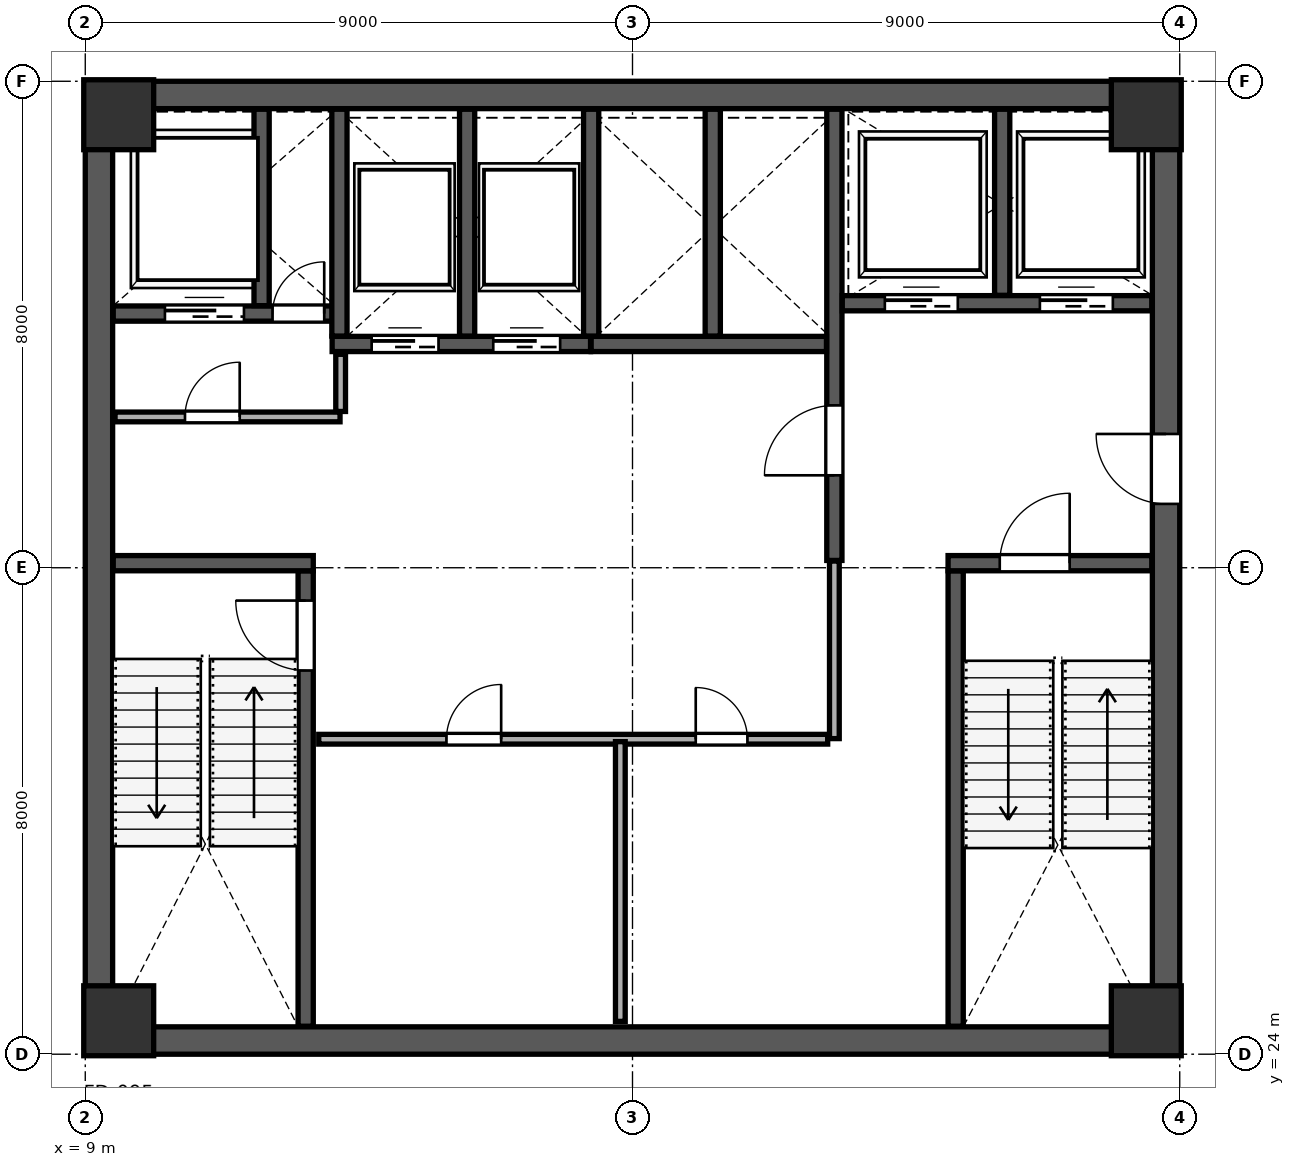
"""IFC4 building model, lengths in metres.
Left out: names, types, materials, properties, quantities, classifications, styles, units other than length and angle.
Written with IfcOpenShell. Run it as: python <this file> out.ifc"""

import sys

from ifc_helpers import new_model, si_unit, direction, frame, frame_2d, origin, origin_2d, place, context, subcontext, project, spatial, rectangle, extrude, source, transform, mapped, element, fill, save


model = new_model("IFC4")
c1 = context("Model", 3, precision=1e-05, world=origin(), true_north=direction((0.0, 1.0)))
c2 = subcontext(c1, "Body", "Model", "MODEL_VIEW")
j1 = project(units=[si_unit("LENGTHUNIT", "METRE"), si_unit("PLANEANGLEUNIT", "RADIAN")], contexts=[c1])
p1 = place(None, origin())
s1 = spatial("IfcSite", under=j1, at=p1, CompositionType="ELEMENT")
p2 = place(p1, origin())
s2 = spatial("IfcBuilding", under=s1, at=p2, CompositionType="ELEMENT")
p3 = place(p2, frame((0.0, 0.0, 141.4)))
s3 = spatial("IfcBuildingStorey", under=s2, at=p3, CompositionType="ELEMENT", Elevation=141.4)
m1 = source(origin(), c2, "Body", "SweptSolid", [
    extrude(rectangle(XDim=1.15, YDim=1.15, at=origin_2d()), origin(), (0.0, 0.0, 1.0), 4.199),
])
for number, where, z_axis, x_axis in (
    (1, (9.55, 24.55, 0.001), (0.0, 0.0, 1.0), (1.0, 0.0, 0.0)),
    (2, (26.45, 24.55, 0.001), (0.0, 0.0, 1.0), (1.0, 0.0, 0.0)),
    (3, (9.55, 39.45, 0.001), (0.0, 0.0, 1.0), (1.0, 0.0, 0.0)),
    (4, (26.45, 39.45, 0.001), (0.0, 0.0, 1.0), (1.0, 0.0, 0.0)),
):
    element("IfcColumn", number, at=place(p3, frame(where, z_axis=z_axis, x_axis=x_axis)), inside=s3, PredefinedType="COLUMN", context=c2, shape_type="MappedRepresentation", body=[
        mapped(m1, transform((0.0, 0.0, 0.0), scale=1.0)),
    ])
p4 = place(p3, frame((9.225, 24.45, 0.0), z_axis=(0.0, 0.0, 1.0), x_axis=(0.0, 1.0, 0.0)))
e5 = element("IfcWall", 5, at=p4, inside=s3, PredefinedType="SHEAR", context=c2, shape_type="SweptSolid", body=[
    extrude(rectangle(XDim=15.1, YDim=0.45, at=frame_2d((7.55, 0.0))), origin(), (0.0, 0.0, 1.0), 3.96),
])
p5 = place(p3, frame((26.775, 24.45, 0.0), z_axis=(0.0, 0.0, 1.0), x_axis=(0.0, 1.0, 0.0)))
e6 = element("IfcWall", 6, at=p5, inside=s3, PredefinedType="SHEAR", context=c2, shape_type="SweptSolid", body=[
    extrude(rectangle(XDim=15.1, YDim=0.45, at=frame_2d((7.55, 0.0))), origin(), (0.0, 0.0, 1.0), 3.96),
])
p6 = place(p5, frame((8.6, 0.0, 0.0)))
e7 = element("IfcOpeningElement", 7, at=p6, cuts=e6, PredefinedType="OPENING", context=c2, shape_type="SweptSolid", body=[
    extrude(rectangle(XDim=1.15, YDim=2.2, at=frame_2d((0.575, 1.1))), frame((0.0, 0.235, 0.0), z_axis=(0.0, -1.0, 0.0), x_axis=(1.0, 0.0, 0.0)), (0.0, 0.0, 1.0), 0.47),
])
for number, where, z_axis, x_axis in (
    (8, (9.0, 24.225, 0.0), (0.0, 0.0, 1.0), (1.0, 0.0, 0.0)),
    (9, (9.0, 39.775, 0.0), (0.0, 0.0, 1.0), (1.0, 0.0, 0.0)),
):
    element("IfcWall", number, at=place(p3, frame(where, z_axis=z_axis, x_axis=x_axis)), inside=s3, PredefinedType="SHEAR", context=c2, shape_type="SweptSolid", body=[
        extrude(rectangle(XDim=18.0, YDim=0.45, at=frame_2d((9.0, 0.0))), origin(), (0.0, 0.0, 1.0), 3.96),
    ])
p7 = place(p3, frame((12.625, 24.46, 0.0), z_axis=(0.0, 0.0, 1.0), x_axis=(0.0, 1.0, 0.0)))
e10 = element("IfcWall", 10, at=p7, inside=s3, PredefinedType="SHEAR", context=c2, shape_type="SweptSolid", body=[
    extrude(rectangle(XDim=7.49, YDim=0.25, at=frame_2d((3.745, 0.0))), origin(), (0.0, 0.0, 1.0), 3.96),
])
p8 = place(p7, frame((5.85, 0.0, 0.0)))
e11 = element("IfcOpeningElement", 11, at=p8, cuts=e10, PredefinedType="OPENING", context=c2, shape_type="SweptSolid", body=[
    extrude(rectangle(XDim=1.15, YDim=2.2, at=frame_2d((0.575, 1.1))), frame((0.0, 0.135, 0.0), z_axis=(0.0, -1.0, 0.0), x_axis=(1.0, 0.0, 0.0)), (0.0, 0.0, 1.0), 0.27),
])
p9 = place(p3, frame((9.46, 32.075, 0.0), z_axis=(0.0, 0.0, 1.0), x_axis=(1.0, 0.0, 0.0)))
e12 = element("IfcWall", 12, at=p9, inside=s3, PredefinedType="SHEAR", context=c2, shape_type="SweptSolid", body=[
    extrude(rectangle(XDim=3.29, YDim=0.25, at=frame_2d((1.645, 0.0))), origin(), (0.0, 0.0, 1.0), 3.96),
])
p10 = place(p3, frame((23.315, 24.46, 0.0), z_axis=(0.0, 0.0, 1.0), x_axis=(0.0, 1.0, 0.0)))
e13 = element("IfcWall", 13, at=p10, inside=s3, PredefinedType="SHEAR", context=c2, shape_type="SweptSolid", body=[
    extrude(rectangle(XDim=7.49, YDim=0.25, at=frame_2d((3.745, 0.0))), origin(), (0.0, 0.0, 1.0), 3.96),
])
p11 = place(p3, frame((23.19, 32.075, 0.0), z_axis=(0.0, 0.0, 1.0), x_axis=(1.0, 0.0, 0.0)))
e14 = element("IfcWall", 14, at=p11, inside=s3, PredefinedType="SHEAR", context=c2, shape_type="SweptSolid", body=[
    extrude(rectangle(XDim=3.35, YDim=0.25, at=frame_2d((1.675, 0.0))), origin(), (0.0, 0.0, 1.0), 3.96),
])
p12 = place(p11, frame((0.85, 0.0, 0.0)))
e15 = element("IfcOpeningElement", 15, at=p12, cuts=e14, PredefinedType="OPENING", context=c2, shape_type="SweptSolid", body=[
    extrude(rectangle(XDim=1.15, YDim=2.2, at=frame_2d((0.575, 1.1))), frame((0.0, 0.135, 0.0), z_axis=(0.0, -1.0, 0.0), x_axis=(1.0, 0.0, 0.0)), (0.0, 0.0, 1.0), 0.27),
])
p13 = place(p3, frame((21.32, 32.12, 0.0), z_axis=(0.0, 0.0, 1.0), x_axis=(0.0, 1.0, 0.0)))
e16 = element("IfcWall", 16, at=p13, inside=s3, PredefinedType="SHEAR", context=c2, shape_type="SweptSolid", body=[
    extrude(rectangle(XDim=7.42, YDim=0.25, at=frame_2d((3.71, 0.0))), origin(), (0.0, 0.0, 1.0), 3.96),
])
p14 = place(p13, frame((1.4, 0.0, 0.0)))
e17 = element("IfcOpeningElement", 17, at=p14, cuts=e16, PredefinedType="OPENING", context=c2, shape_type="SweptSolid", body=[
    extrude(rectangle(XDim=1.15, YDim=2.2, at=frame_2d((0.575, 1.1))), frame((0.0, 0.135, 0.0), z_axis=(0.0, -1.0, 0.0), x_axis=(1.0, 0.0, 0.0)), (0.0, 0.0, 1.0), 0.27),
])
p15 = place(p3, frame((9.46, 36.18, 0.0), z_axis=(0.0, 0.0, 1.0), x_axis=(1.0, 0.0, 0.0)))
e18 = element("IfcWall", 18, at=p15, inside=s3, PredefinedType="SHEAR", context=c2, shape_type="SweptSolid", body=[
    extrude(rectangle(XDim=3.79, YDim=0.25, at=frame_2d((1.895, 0.0))), origin(), (0.0, 0.0, 1.0), 3.96),
])
p16 = place(p15, frame((2.62, 0.0, 0.0)))
e19 = element("IfcOpeningElement", 19, at=p16, cuts=e18, PredefinedType="OPENING", context=c2, shape_type="SweptSolid", body=[
    extrude(rectangle(XDim=0.85, YDim=2.1, at=frame_2d((0.425, 1.05))), frame((0.0, 0.135, 0.0), z_axis=(0.0, -1.0, 0.0), x_axis=(1.0, 0.0, 0.0)), (0.0, 0.0, 1.0), 0.27),
])
p17 = place(p15, frame((0.85, 0.0, 0.0)))
e20 = element("IfcOpeningElement", 20, at=p17, cuts=e18, PredefinedType="OPENING", context=c2, shape_type="SweptSolid", body=[
    extrude(rectangle(XDim=1.3, YDim=2.25, at=frame_2d((0.65, 1.125))), frame((0.0, 0.135, 0.0), z_axis=(0.0, -1.0, 0.0), x_axis=(1.0, 0.0, 0.0)), (0.0, 0.0, 1.0), 0.27),
])
p18 = place(p3, frame((11.9, 36.31, 0.0), z_axis=(0.0, 0.0, 1.0), x_axis=(0.0, 1.0, 0.0)))
e21 = element("IfcWall", 21, at=p18, inside=s3, PredefinedType="SHEAR", context=c2, shape_type="SweptSolid", body=[
    extrude(rectangle(XDim=3.23, YDim=0.25, at=frame_2d((1.615, 0.0))), origin(), (0.0, 0.0, 1.0), 3.96),
])
p19 = place(p3, frame((21.45, 36.35, 0.0), z_axis=(0.0, 0.0, 1.0), x_axis=(1.0, 0.0, 0.0)))
e22 = element("IfcWall", 22, at=p19, inside=s3, PredefinedType="SHEAR", context=c2, shape_type="SweptSolid", body=[
    extrude(rectangle(XDim=5.09, YDim=0.25, at=frame_2d((2.545, 0.0))), origin(), (0.0, 0.0, 1.0), 3.96),
])
p20 = place(p19, frame((0.7, 0.0, 0.0)))
e23 = element("IfcOpeningElement", 23, at=p20, cuts=e22, PredefinedType="OPENING", context=c2, shape_type="SweptSolid", body=[
    extrude(rectangle(XDim=1.2, YDim=2.2, at=frame_2d((0.6, 1.1))), frame((0.0, 0.135, 0.0), z_axis=(0.0, -1.0, 0.0), x_axis=(1.0, 0.0, 0.0)), (0.0, 0.0, 1.0), 0.27),
])
p21 = place(p19, frame((3.25, 0.0, 0.0)))
e24 = element("IfcOpeningElement", 24, at=p21, cuts=e22, PredefinedType="OPENING", context=c2, shape_type="SweptSolid", body=[
    extrude(rectangle(XDim=1.2, YDim=2.2, at=frame_2d((0.6, 1.1))), frame((0.0, 0.135, 0.0), z_axis=(0.0, -1.0, 0.0), x_axis=(1.0, 0.0, 0.0)), (0.0, 0.0, 1.0), 0.27),
])
p22 = place(p3, frame((24.08, 36.48, 0.0), z_axis=(0.0, 0.0, 1.0), x_axis=(0.0, 1.0, 0.0)))
e25 = element("IfcWall", 25, at=p22, inside=s3, PredefinedType="SHEAR", context=c2, shape_type="SweptSolid", body=[
    extrude(rectangle(XDim=3.06, YDim=0.25, at=frame_2d((1.53, 0.0))), origin(), (0.0, 0.0, 1.0), 3.96),
])
p23 = place(p3, frame((13.06, 35.68, 0.0), z_axis=(0.0, 0.0, 1.0), x_axis=(1.0, 0.0, 0.0)))
e26 = element("IfcWall", 26, at=p23, inside=s3, PredefinedType="SHEAR", context=c2, shape_type="SweptSolid", body=[
    extrude(rectangle(XDim=4.25, YDim=0.25, at=frame_2d((2.125, 0.0))), origin(), (0.0, 0.0, 1.0), 3.96),
])
p24 = place(p23, frame((0.65, 0.0, 0.0)))
e27 = element("IfcOpeningElement", 27, at=p24, cuts=e26, PredefinedType="OPENING", context=c2, shape_type="SweptSolid", body=[
    extrude(rectangle(XDim=1.1, YDim=2.2, at=frame_2d((0.55, 1.1))), frame((0.0, 0.135, 0.0), z_axis=(0.0, -1.0, 0.0), x_axis=(1.0, 0.0, 0.0)), (0.0, 0.0, 1.0), 0.27),
])
p25 = place(p23, frame((2.65, 0.0, 0.0)))
e28 = element("IfcOpeningElement", 28, at=p25, cuts=e26, PredefinedType="OPENING", context=c2, shape_type="SweptSolid", body=[
    extrude(rectangle(XDim=1.1, YDim=2.2, at=frame_2d((0.55, 1.1))), frame((0.0, 0.135, 0.0), z_axis=(0.0, -1.0, 0.0), x_axis=(1.0, 0.0, 0.0)), (0.0, 0.0, 1.0), 0.27),
])
for number, where, z_axis, x_axis in (
    (29, (13.18, 35.81, 0.0), (0.0, 0.0, 1.0), (0.0, 1.0, 0.0)),
    (30, (15.28, 35.81, 0.0), (0.0, 0.0, 1.0), (0.0, 1.0, 0.0)),
):
    element("IfcWall", number, at=place(p3, frame(where, z_axis=z_axis, x_axis=x_axis)), inside=s3, PredefinedType="SHEAR", context=c2, shape_type="SweptSolid", body=[
        extrude(rectangle(XDim=3.73, YDim=0.25, at=frame_2d((1.865, 0.0))), origin(), (0.0, 0.0, 1.0), 3.96),
    ])
p26 = place(p3, frame((17.32, 35.68, 0.0), z_axis=(0.0, 0.0, 1.0), x_axis=(1.0, 0.0, 0.0)))
e31 = element("IfcWall", 31, at=p26, inside=s3, PredefinedType="SHEAR", context=c2, shape_type="SweptSolid", body=[
    extrude(rectangle(XDim=3.87, YDim=0.25, at=frame_2d((1.935, 0.0))), origin(), (0.0, 0.0, 1.0), 3.96),
])
for number, where, z_axis, x_axis in (
    (32, (17.32, 35.81, 0.0), (0.0, 0.0, 1.0), (0.0, 1.0, 0.0)),
    (33, (19.32, 35.81, 0.0), (0.0, 0.0, 1.0), (0.0, 1.0, 0.0)),
):
    element("IfcWall", number, at=place(p3, frame(where, z_axis=z_axis, x_axis=x_axis)), inside=s3, PredefinedType="SHEAR", context=c2, shape_type="SweptSolid", body=[
        extrude(rectangle(XDim=3.73, YDim=0.25, at=frame_2d((1.865, 0.0))), origin(), (0.0, 0.0, 1.0), 3.96),
    ])
p27 = place(p3, frame((9.49, 34.48, 0.0), z_axis=(0.0, 0.0, 1.0), x_axis=(1.0, 0.0, 0.0)))
e34 = element("IfcWall", 34, at=p27, inside=s3, PredefinedType="PARTITIONING", context=c2, shape_type="SweptSolid", body=[
    extrude(rectangle(XDim=3.7, YDim=0.16, at=frame_2d((1.85, 0.0))), origin(), (0.0, 0.0, 1.0), 3.96),
])
p28 = place(p27, frame((1.15, 0.0, 0.0)))
e35 = element("IfcOpeningElement", 35, at=p28, cuts=e34, PredefinedType="OPENING", context=c2, shape_type="SweptSolid", body=[
    extrude(rectangle(XDim=0.9, YDim=2.15, at=frame_2d((0.45, 1.075))), frame((0.0, 0.09, 0.0), z_axis=(0.0, -1.0, 0.0), x_axis=(1.0, 0.0, 0.0)), (0.0, 0.0, 1.0), 0.18),
])
p29 = place(p3, frame((13.2, 34.57, 0.0), z_axis=(0.0, 0.0, 1.0), x_axis=(0.0, 1.0, 0.0)))
e36 = element("IfcWall", 36, at=p29, inside=s3, PredefinedType="PARTITIONING", context=c2, shape_type="SweptSolid", body=[
    extrude(rectangle(XDim=0.94, YDim=0.16, at=frame_2d((0.47, 0.0))), origin(), (0.0, 0.0, 1.0), 3.96),
])
p30 = place(p3, frame((12.84, 29.18, 0.0), z_axis=(0.0, 0.0, 1.0), x_axis=(1.0, 0.0, 0.0)))
e37 = element("IfcWall", 37, at=p30, inside=s3, PredefinedType="PARTITIONING", context=c2, shape_type="SweptSolid", body=[
    extrude(rectangle(XDim=8.37, YDim=0.16, at=frame_2d((4.185, 0.0))), origin(), (0.0, 0.0, 1.0), 3.96),
])
p31 = place(p30, frame((2.1, 0.0, 0.0)))
e38 = element("IfcOpeningElement", 38, at=p31, cuts=e37, PredefinedType="OPENING", context=c2, shape_type="SweptSolid", body=[
    extrude(rectangle(XDim=0.9, YDim=2.15, at=frame_2d((0.45, 1.075))), frame((0.0, 0.09, 0.0), z_axis=(0.0, -1.0, 0.0), x_axis=(1.0, 0.0, 0.0)), (0.0, 0.0, 1.0), 0.18),
])
p32 = place(p30, frame((6.2, 0.0, 0.0)))
e39 = element("IfcOpeningElement", 39, at=p32, cuts=e37, PredefinedType="OPENING", context=c2, shape_type="SweptSolid", body=[
    extrude(rectangle(XDim=0.85, YDim=2.1, at=frame_2d((0.425, 1.05))), frame((0.0, 0.09, 0.0), z_axis=(0.0, -1.0, 0.0), x_axis=(1.0, 0.0, 0.0)), (0.0, 0.0, 1.0), 0.18),
])
p33 = place(p3, frame((17.8, 24.54, 0.0), z_axis=(0.0, 0.0, 1.0), x_axis=(0.0, 1.0, 0.0)))
e40 = element("IfcWall", 40, at=p33, inside=s3, PredefinedType="PARTITIONING", context=c2, shape_type="SweptSolid", body=[
    extrude(rectangle(XDim=4.6, YDim=0.16, at=frame_2d((2.3, 0.0))), origin(), (0.0, 0.0, 1.0), 3.96),
])
p34 = place(p3, frame((21.32, 29.19, 0.0), z_axis=(0.0, 0.0, 1.0), x_axis=(0.0, 1.0, 0.0)))
e41 = element("IfcWall", 41, at=p34, inside=s3, PredefinedType="PARTITIONING", context=c2, shape_type="SweptSolid", body=[
    extrude(rectangle(XDim=2.92, YDim=0.16, at=frame_2d((1.46, 0.0))), origin(), (0.0, 0.0, 1.0), 3.96),
])
p35 = place(p3, frame((9.523, 48.867, 0.0), z_axis=(0.0, 0.0, 1.0), x_axis=(0.923882225555, -0.382676930718, 0.0)))
e42 = element("IfcWall", 42, at=p35, inside=s3, PredefinedType="PARTITIONING", context=c2, shape_type="SweptSolid", body=[
    extrude(rectangle(XDim=27.61, YDim=0.1, at=frame_2d((13.805, 0.0))), origin(), (0.0, 0.0, 1.0), 3.96),
])
p36 = place(p35, frame((20.31, 0.0, 0.0)))
e43 = element("IfcOpeningElement", 43, at=p36, cuts=e42, PredefinedType="OPENING", context=c2, shape_type="SweptSolid", body=[
    extrude(rectangle(XDim=0.95, YDim=2.15, at=frame_2d((0.475, 1.075))), frame((0.0, 0.06, 0.0), z_axis=(0.0, -1.0, 0.0), x_axis=(1.0, 0.0, 0.0)), (0.0, 0.0, 1.0), 0.12),
])
p37 = place(p3, frame((23.963, 11.475, 0.0), z_axis=(0.0, 0.0, 1.0), x_axis=(0.382686018031, 0.923878461489, 0.0)))
e44 = element("IfcWall", 44, at=p37, inside=s3, PredefinedType="PARTITIONING", context=c2, shape_type="SweptSolid", body=[
    extrude(rectangle(XDim=14.58, YDim=0.16, at=frame_2d((7.29, 0.0))), origin(), (0.0, 0.0, 1.0), 3.96),
])
m2 = source(origin(), c2, "Body", "SweptSolid", [
    extrude(rectangle(XDim=1.15, YDim=2.2, at=frame_2d((0.575, 1.1))), frame((0.0, 0.025, 0.0), z_axis=(0.0, -1.0, 0.0), x_axis=(1.0, 0.0, 0.0)), (0.0, 0.0, 1.0), 0.05),
])
p38 = place(p8, origin())
e45 = element("IfcDoor", 45, at=p38, inside=s3, OperationType="SINGLE_SWING_RIGHT", PredefinedType="DOOR", context=c2, shape_type="MappedRepresentation", body=[
    mapped(m2, transform((0.0, 0.0, 0.0), scale=1.0)),
])
fill(e11, e45)
m3 = source(origin(), c2, "Body", "SweptSolid", [
    extrude(rectangle(XDim=1.15, YDim=2.2, at=frame_2d((0.575, 1.1))), frame((0.0, 0.025, 0.0), z_axis=(0.0, -1.0, 0.0), x_axis=(1.0, 0.0, 0.0)), (0.0, 0.0, 1.0), 0.05),
])
p39 = place(p14, origin())
e46 = element("IfcDoor", 46, at=p39, inside=s3, OperationType="SINGLE_SWING_LEFT", PredefinedType="DOOR", context=c2, shape_type="MappedRepresentation", body=[
    mapped(m3, transform((0.0, 0.0, 0.0), scale=1.0)),
])
fill(e17, e46)
p40 = place(p12, origin())
e47 = element("IfcDoor", 47, at=p40, inside=s3, OperationType="SINGLE_SWING_RIGHT", PredefinedType="DOOR", context=c2, shape_type="MappedRepresentation", body=[
    mapped(m2, transform((0.0, 0.0, 0.0), scale=1.0)),
])
fill(e15, e47)
p41 = place(p6, origin())
e48 = element("IfcDoor", 48, at=p41, inside=s3, OperationType="SINGLE_SWING_RIGHT", PredefinedType="DOOR", context=c2, shape_type="MappedRepresentation", body=[
    mapped(m3, transform((0.0, 0.0, 0.0), scale=1.0)),
])
fill(e7, e48)
m4 = source(origin(), c2, "Body", "SweptSolid", [
    extrude(rectangle(XDim=0.85, YDim=2.1, at=frame_2d((0.425, 1.05))), frame((0.0, 0.025, 0.0), z_axis=(0.0, -1.0, 0.0), x_axis=(1.0, 0.0, 0.0)), (0.0, 0.0, 1.0), 0.05),
])
p42 = place(p16, origin())
e49 = element("IfcDoor", 49, at=p42, inside=s3, OperationType="SINGLE_SWING_RIGHT", PredefinedType="DOOR", context=c2, shape_type="MappedRepresentation", body=[
    mapped(m4, transform((0.0, 0.0, 0.0), scale=1.0)),
])
fill(e19, e49)
m5 = source(origin(), c2, "Body", "SweptSolid", [
    extrude(rectangle(XDim=1.1, YDim=2.2, at=frame_2d((0.55, 1.1))), frame((0.0, 0.025, 0.0), z_axis=(0.0, -1.0, 0.0), x_axis=(1.0, 0.0, 0.0)), (0.0, 0.0, 1.0), 0.05),
])
p43 = place(p24, origin())
e50 = element("IfcDoor", 50, at=p43, inside=s3, OperationType="SLIDING_TO_LEFT", PredefinedType="DOOR", context=c2, shape_type="MappedRepresentation", body=[
    mapped(m5, transform((0.0, 0.0, 0.0), scale=1.0)),
])
fill(e27, e50)
p44 = place(p25, origin())
e51 = element("IfcDoor", 51, at=p44, inside=s3, OperationType="SLIDING_TO_RIGHT", PredefinedType="DOOR", context=c2, shape_type="MappedRepresentation", body=[
    mapped(m5, transform((0.0, 0.0, 0.0), scale=1.0)),
])
fill(e28, e51)
m6 = source(origin(), c2, "Body", "SweptSolid", [
    extrude(rectangle(XDim=1.2, YDim=2.2, at=frame_2d((0.6, 1.1))), frame((0.0, 0.025, 0.0), z_axis=(0.0, -1.0, 0.0), x_axis=(1.0, 0.0, 0.0)), (0.0, 0.0, 1.0), 0.05),
])
p45 = place(p20, origin())
e52 = element("IfcDoor", 52, at=p45, inside=s3, OperationType="SLIDING_TO_LEFT", PredefinedType="DOOR", context=c2, shape_type="MappedRepresentation", body=[
    mapped(m6, transform((0.0, 0.0, 0.0), scale=1.0)),
])
fill(e23, e52)
p46 = place(p21, origin())
e53 = element("IfcDoor", 53, at=p46, inside=s3, OperationType="SLIDING_TO_RIGHT", PredefinedType="DOOR", context=c2, shape_type="MappedRepresentation", body=[
    mapped(m6, transform((0.0, 0.0, 0.0), scale=1.0)),
])
fill(e24, e53)
m7 = source(origin(), c2, "Body", "SweptSolid", [
    extrude(rectangle(XDim=1.3, YDim=2.25, at=frame_2d((0.65, 1.125))), frame((0.0, 0.025, 0.0), z_axis=(0.0, -1.0, 0.0), x_axis=(1.0, 0.0, 0.0)), (0.0, 0.0, 1.0), 0.05),
])
p47 = place(p17, origin())
e54 = element("IfcDoor", 54, at=p47, inside=s3, OperationType="SLIDING_TO_LEFT", PredefinedType="DOOR", context=c2, shape_type="MappedRepresentation", body=[
    mapped(m7, transform((0.0, 0.0, 0.0), scale=1.0)),
])
fill(e20, e54)
m8 = source(origin(), c2, "Body", "SweptSolid", [
    extrude(rectangle(XDim=0.9, YDim=2.15, at=frame_2d((0.45, 1.075))), frame((0.0, 0.025, 0.0), z_axis=(0.0, -1.0, 0.0), x_axis=(1.0, 0.0, 0.0)), (0.0, 0.0, 1.0), 0.05),
])
p48 = place(p28, origin())
e55 = element("IfcDoor", 55, at=p48, inside=s3, OperationType="SINGLE_SWING_RIGHT", PredefinedType="DOOR", context=c2, shape_type="MappedRepresentation", body=[
    mapped(m8, transform((0.0, 0.0, 0.0), scale=1.0)),
])
fill(e35, e55)
p49 = place(p31, origin())
e56 = element("IfcDoor", 56, at=p49, inside=s3, OperationType="SINGLE_SWING_RIGHT", PredefinedType="DOOR", context=c2, shape_type="MappedRepresentation", body=[
    mapped(m8, transform((0.0, 0.0, 0.0), scale=1.0)),
])
fill(e38, e56)
p50 = place(p32, origin())
e57 = element("IfcDoor", 57, at=p50, inside=s3, OperationType="SINGLE_SWING_LEFT", PredefinedType="DOOR", context=c2, shape_type="MappedRepresentation", body=[
    mapped(m4, transform((0.0, 0.0, 0.0), scale=1.0)),
])
fill(e39, e57)
save(model, sys.argv[1])
